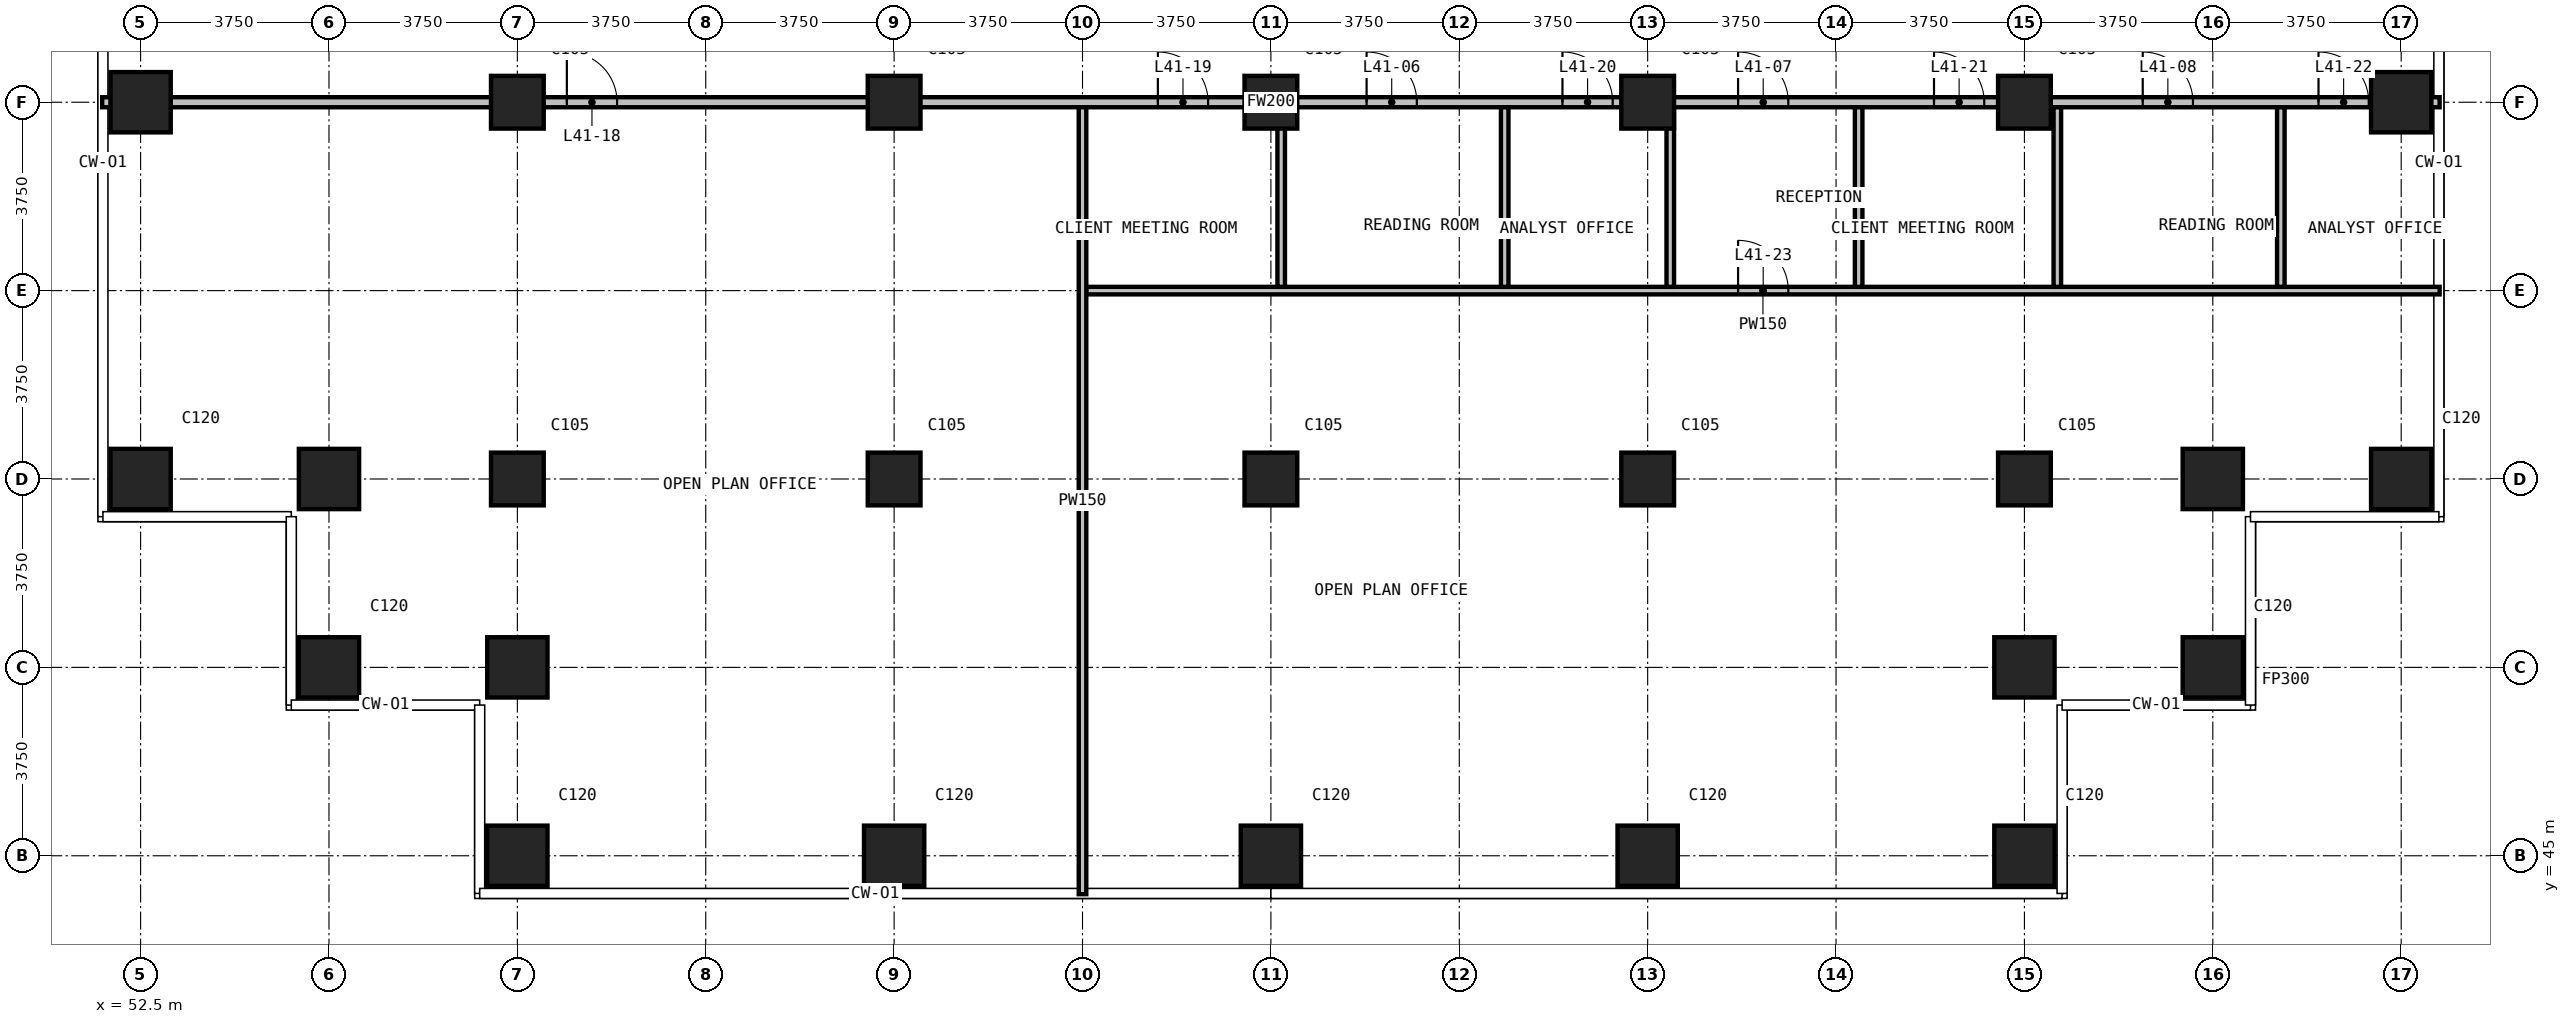
"""IFC4 building model, lengths in metres.
Left out: names, types, materials, properties, quantities, classifications, styles, units other than length and angle.
Written with IfcOpenShell. Run it as: python <this file> out.ifc"""

import sys

from ifc_helpers import new_model, si_unit, direction, frame, frame_2d, origin, origin_2d, place, context, subcontext, project, spatial, rectangle, extrude, element, fill, save


model = new_model("IFC4")
c1 = context("Model", 3, precision=1e-05, world=origin(), true_north=direction((0.0, 1.0)))
c2 = subcontext(c1, "Body", "Model", "MODEL_VIEW")
j1 = project(units=[si_unit("LENGTHUNIT", "METRE"), si_unit("PLANEANGLEUNIT", "RADIAN")], contexts=[c1])
p1 = place(None, origin())
s1 = spatial("IfcSite", under=j1, at=p1, CompositionType="ELEMENT")
p2 = place(p1, origin())
s2 = spatial("IfcBuilding", under=s1, at=p2, CompositionType="ELEMENT")
p3 = place(p2, frame((0.0, 0.0, 162.1)))
s3 = spatial("IfcBuildingStorey", under=s2, at=p3, CompositionType="ELEMENT", Elevation=162.1)
for number, where, z_axis, x_axis in (
    (1, (52.5, 52.5, 0.0), (0.0, 0.0, 1.0), (1.0, 0.0, 0.0)),
    (2, (52.5, 60.0, 0.0), (0.0, 0.0, 1.0), (1.0, 0.0, 0.0)),
    (3, (56.25, 48.75, 0.0), (0.0, 0.0, 1.0), (1.0, 0.0, 0.0)),
    (4, (56.25, 52.5, 0.0), (0.0, 0.0, 1.0), (1.0, 0.0, 0.0)),
    (5, (60.0, 45.0, 0.0), (0.0, 0.0, 1.0), (1.0, 0.0, 0.0)),
    (6, (60.0, 48.75, 0.0), (0.0, 0.0, 1.0), (1.0, 0.0, 0.0)),
):
    element("IfcColumn", number, at=place(p3, frame(where, z_axis=z_axis, x_axis=x_axis)), inside=s3, PredefinedType="COLUMN", context=c2, shape_type="SweptSolid", body=[
        extrude(rectangle(XDim=1.2, YDim=1.2, at=origin_2d()), origin(), (0.0, 0.0, 1.0), 3.6),
    ])
for number, where, z_axis, x_axis in (
    (7, (60.0, 52.5, 0.0), (0.0, 0.0, 1.0), (1.0, 0.0, 0.0)),
    (8, (60.0, 60.0, 0.0), (0.0, 0.0, 1.0), (1.0, 0.0, 0.0)),
):
    element("IfcColumn", number, at=place(p3, frame(where, z_axis=z_axis, x_axis=x_axis)), inside=s3, PredefinedType="COLUMN", context=c2, shape_type="SweptSolid", body=[
        extrude(rectangle(XDim=1.05, YDim=1.05, at=origin_2d()), origin(), (0.0, 0.0, 1.0), 3.6),
    ])
p4 = place(p3, frame((67.5, 45.0, 0.0), z_axis=(0.0, 0.0, 1.0), x_axis=(1.0, 0.0, 0.0)))
e9 = element("IfcColumn", 9, at=p4, inside=s3, PredefinedType="COLUMN", context=c2, shape_type="SweptSolid", body=[
    extrude(rectangle(XDim=1.2, YDim=1.2, at=origin_2d()), origin(), (0.0, 0.0, 1.0), 3.6),
])
for number, where, z_axis, x_axis in (
    (10, (67.5, 52.5, 0.0), (0.0, 0.0, 1.0), (1.0, 0.0, 0.0)),
    (11, (67.5, 60.0, 0.0), (0.0, 0.0, 1.0), (1.0, 0.0, 0.0)),
):
    element("IfcColumn", number, at=place(p3, frame(where, z_axis=z_axis, x_axis=x_axis)), inside=s3, PredefinedType="COLUMN", context=c2, shape_type="SweptSolid", body=[
        extrude(rectangle(XDim=1.05, YDim=1.05, at=origin_2d()), origin(), (0.0, 0.0, 1.0), 3.6),
    ])
p5 = place(p3, frame((75.0, 45.0, 0.0), z_axis=(0.0, 0.0, 1.0), x_axis=(1.0, 0.0, 0.0)))
e12 = element("IfcColumn", 12, at=p5, inside=s3, PredefinedType="COLUMN", context=c2, shape_type="SweptSolid", body=[
    extrude(rectangle(XDim=1.2, YDim=1.2, at=origin_2d()), origin(), (0.0, 0.0, 1.0), 3.6),
])
for number, where, z_axis, x_axis in (
    (13, (75.0, 52.5, 0.0), (0.0, 0.0, 1.0), (1.0, 0.0, 0.0)),
    (14, (75.0, 60.0, 0.0), (0.0, 0.0, 1.0), (1.0, 0.0, 0.0)),
):
    element("IfcColumn", number, at=place(p3, frame(where, z_axis=z_axis, x_axis=x_axis)), inside=s3, PredefinedType="COLUMN", context=c2, shape_type="SweptSolid", body=[
        extrude(rectangle(XDim=1.05, YDim=1.05, at=origin_2d()), origin(), (0.0, 0.0, 1.0), 3.6),
    ])
p6 = place(p3, frame((82.5, 45.0, 0.0), z_axis=(0.0, 0.0, 1.0), x_axis=(1.0, 0.0, 0.0)))
e15 = element("IfcColumn", 15, at=p6, inside=s3, PredefinedType="COLUMN", context=c2, shape_type="SweptSolid", body=[
    extrude(rectangle(XDim=1.2, YDim=1.2, at=origin_2d()), origin(), (0.0, 0.0, 1.0), 3.6),
])
for number, where, z_axis, x_axis in (
    (16, (82.5, 52.5, 0.0), (0.0, 0.0, 1.0), (1.0, 0.0, 0.0)),
    (17, (82.5, 60.0, 0.0), (0.0, 0.0, 1.0), (1.0, 0.0, 0.0)),
):
    element("IfcColumn", number, at=place(p3, frame(where, z_axis=z_axis, x_axis=x_axis)), inside=s3, PredefinedType="COLUMN", context=c2, shape_type="SweptSolid", body=[
        extrude(rectangle(XDim=1.05, YDim=1.05, at=origin_2d()), origin(), (0.0, 0.0, 1.0), 3.6),
    ])
for number, where, z_axis, x_axis in (
    (18, (90.0, 45.0, 0.0), (0.0, 0.0, 1.0), (1.0, 0.0, 0.0)),
    (19, (90.0, 48.75, 0.0), (0.0, 0.0, 1.0), (1.0, 0.0, 0.0)),
):
    element("IfcColumn", number, at=place(p3, frame(where, z_axis=z_axis, x_axis=x_axis)), inside=s3, PredefinedType="COLUMN", context=c2, shape_type="SweptSolid", body=[
        extrude(rectangle(XDim=1.2, YDim=1.2, at=origin_2d()), origin(), (0.0, 0.0, 1.0), 3.6),
    ])
for number, where, z_axis, x_axis in (
    (20, (90.0, 52.5, 0.0), (0.0, 0.0, 1.0), (1.0, 0.0, 0.0)),
    (21, (90.0, 60.0, 0.0), (0.0, 0.0, 1.0), (1.0, 0.0, 0.0)),
):
    element("IfcColumn", number, at=place(p3, frame(where, z_axis=z_axis, x_axis=x_axis)), inside=s3, PredefinedType="COLUMN", context=c2, shape_type="SweptSolid", body=[
        extrude(rectangle(XDim=1.05, YDim=1.05, at=origin_2d()), origin(), (0.0, 0.0, 1.0), 3.6),
    ])
for number, where, z_axis, x_axis in (
    (22, (93.75, 48.75, 0.0), (0.0, 0.0, 1.0), (1.0, 0.0, 0.0)),
    (23, (93.75, 52.5, 0.0), (0.0, 0.0, 1.0), (1.0, 0.0, 0.0)),
    (24, (97.5, 52.5, 0.0), (0.0, 0.0, 1.0), (1.0, 0.0, 0.0)),
    (25, (97.5, 60.0, 0.0), (0.0, 0.0, 1.0), (1.0, 0.0, 0.0)),
):
    element("IfcColumn", number, at=place(p3, frame(where, z_axis=z_axis, x_axis=x_axis)), inside=s3, PredefinedType="COLUMN", context=c2, shape_type="SweptSolid", body=[
        extrude(rectangle(XDim=1.2, YDim=1.2, at=origin_2d()), origin(), (0.0, 0.0, 1.0), 3.6),
    ])
p7 = place(p3, frame((51.735, 60.0, 0.0), z_axis=(0.0, 0.0, 1.0), x_axis=(1.0, 0.0, 0.0)))
e26 = element("IfcWall", 26, at=p7, inside=s3, PredefinedType="PARTITIONING", context=c2, shape_type="SweptSolid", body=[
    extrude(rectangle(XDim=46.53, YDim=0.2, at=frame_2d((23.265, 0.0))), origin(), (0.0, 0.0, 1.0), 3.3),
])
p8 = place(p7, frame((25.17, 0.0, 0.0)))
e27 = element("IfcOpeningElement", 27, at=p8, cuts=e26, PredefinedType="OPENING", context=c2, shape_type="SweptSolid", body=[
    extrude(rectangle(XDim=1.0, YDim=2.2, at=frame_2d((0.5, 1.1))), frame((0.0, 0.11, 0.0), z_axis=(0.0, -1.0, 0.0), x_axis=(1.0, 0.0, 0.0)), (0.0, 0.0, 1.0), 0.22),
])
p9 = place(p7, frame((32.565, 0.0, 0.0)))
e28 = element("IfcOpeningElement", 28, at=p9, cuts=e26, PredefinedType="OPENING", context=c2, shape_type="SweptSolid", body=[
    extrude(rectangle(XDim=1.0, YDim=2.2, at=frame_2d((0.5, 1.1))), frame((0.0, 0.11, 0.0), z_axis=(0.0, -1.0, 0.0), x_axis=(1.0, 0.0, 0.0)), (0.0, 0.0, 1.0), 0.22),
])
p10 = place(p7, frame((40.62, 0.0, 0.0)))
e29 = element("IfcOpeningElement", 29, at=p10, cuts=e26, PredefinedType="OPENING", context=c2, shape_type="SweptSolid", body=[
    extrude(rectangle(XDim=1.0, YDim=2.2, at=frame_2d((0.5, 1.1))), frame((0.0, 0.11, 0.0), z_axis=(0.0, -1.0, 0.0), x_axis=(1.0, 0.0, 0.0)), (0.0, 0.0, 1.0), 0.22),
])
p11 = place(p7, frame((9.25, 0.0, 0.0)))
e30 = element("IfcOpeningElement", 30, at=p11, cuts=e26, PredefinedType="OPENING", context=c2, shape_type="SweptSolid", body=[
    extrude(rectangle(XDim=1.0, YDim=2.2, at=frame_2d((0.5, 1.1))), frame((0.0, 0.11, 0.0), z_axis=(0.0, -1.0, 0.0), x_axis=(1.0, 0.0, 0.0)), (0.0, 0.0, 1.0), 0.22),
])
p12 = place(p7, frame((21.015, 0.0, 0.0)))
e31 = element("IfcOpeningElement", 31, at=p12, cuts=e26, PredefinedType="OPENING", context=c2, shape_type="SweptSolid", body=[
    extrude(rectangle(XDim=1.0, YDim=2.2, at=frame_2d((0.5, 1.1))), frame((0.0, 0.11, 0.0), z_axis=(0.0, -1.0, 0.0), x_axis=(1.0, 0.0, 0.0)), (0.0, 0.0, 1.0), 0.22),
])
p13 = place(p7, frame((29.069, 0.0, 0.0)))
e32 = element("IfcOpeningElement", 32, at=p13, cuts=e26, PredefinedType="OPENING", context=c2, shape_type="SweptSolid", body=[
    extrude(rectangle(XDim=1.0, YDim=2.2, at=frame_2d((0.5, 1.1))), frame((0.0, 0.11, 0.0), z_axis=(0.0, -1.0, 0.0), x_axis=(1.0, 0.0, 0.0)), (0.0, 0.0, 1.0), 0.22),
])
p14 = place(p7, frame((36.465, 0.0, 0.0)))
e33 = element("IfcOpeningElement", 33, at=p14, cuts=e26, PredefinedType="OPENING", context=c2, shape_type="SweptSolid", body=[
    extrude(rectangle(XDim=1.0, YDim=2.2, at=frame_2d((0.5, 1.1))), frame((0.0, 0.11, 0.0), z_axis=(0.0, -1.0, 0.0), x_axis=(1.0, 0.0, 0.0)), (0.0, 0.0, 1.0), 0.22),
])
p15 = place(p7, frame((44.119, 0.0, 0.0)))
e34 = element("IfcOpeningElement", 34, at=p15, cuts=e26, PredefinedType="OPENING", context=c2, shape_type="SweptSolid", body=[
    extrude(rectangle(XDim=1.0, YDim=2.2, at=frame_2d((0.5, 1.1))), frame((0.0, 0.11, 0.0), z_axis=(0.0, -1.0, 0.0), x_axis=(1.0, 0.0, 0.0)), (0.0, 0.0, 1.0), 0.22),
])
p16 = place(p3, frame((71.325, 56.25, 0.0), z_axis=(0.0, 0.0, 1.0), x_axis=(1.0, 0.0, 0.0)))
e35 = element("IfcWall", 35, at=p16, inside=s3, PredefinedType="PARTITIONING", context=c2, shape_type="SweptSolid", body=[
    extrude(rectangle(XDim=26.94, YDim=0.15, at=frame_2d((13.47, 0.0))), origin(), (0.0, 0.0, 1.0), 3.3),
])
p17 = place(p16, frame((12.975, 0.0, 0.0)))
e36 = element("IfcOpeningElement", 36, at=p17, cuts=e35, PredefinedType="OPENING", context=c2, shape_type="SweptSolid", body=[
    extrude(rectangle(XDim=1.0, YDim=2.2, at=frame_2d((0.5, 1.1))), frame((0.0, 0.085, 0.0), z_axis=(0.0, -1.0, 0.0), x_axis=(1.0, 0.0, 0.0)), (0.0, 0.0, 1.0), 0.17),
])
p18 = place(p3, frame((71.25, 44.235, 0.0), z_axis=(0.0, 0.0, 1.0), x_axis=(0.0, 1.0, 0.0)))
e37 = element("IfcWall", 37, at=p18, inside=s3, PredefinedType="PARTITIONING", context=c2, shape_type="SweptSolid", body=[
    extrude(rectangle(XDim=15.665, YDim=0.15, at=frame_2d((7.833, 0.0))), origin(), (0.0, 0.0, 1.0), 3.3),
])
for number, where, z_axis, x_axis in (
    (38, (75.205, 56.325, 0.0), (0.0, 0.0, 1.0), (0.0, 1.0, 0.0)),
    (39, (79.654, 56.325, 0.0), (0.0, 0.0, 1.0), (0.0, 1.0, 0.0)),
    (40, (82.95, 56.325, 0.0), (0.0, 0.0, 1.0), (0.0, 1.0, 0.0)),
    (41, (86.7, 56.325, 0.0), (0.0, 0.0, 1.0), (0.0, 1.0, 0.0)),
    (42, (90.655, 56.325, 0.0), (0.0, 0.0, 1.0), (0.0, 1.0, 0.0)),
    (43, (95.104, 56.325, 0.0), (0.0, 0.0, 1.0), (0.0, 1.0, 0.0)),
):
    element("IfcWall", number, at=place(p3, frame(where, z_axis=z_axis, x_axis=x_axis)), inside=s3, PredefinedType="PARTITIONING", context=c2, shape_type="SweptSolid", body=[
        extrude(rectangle(XDim=3.575, YDim=0.15, at=frame_2d((1.788, 0.0))), origin(), (0.0, 0.0, 1.0), 3.3),
    ])
p19 = place(p8, origin())
e44 = element("IfcDoor", 44, at=p19, inside=s3, OperationType="SINGLE_SWING_LEFT", PredefinedType="DOOR", context=c2, shape_type="SweptSolid", body=[
    extrude(rectangle(XDim=1.0, YDim=2.2, at=frame_2d((0.5, 1.1))), frame((0.0, 0.025, 0.0), z_axis=(0.0, -1.0, 0.0), x_axis=(1.0, 0.0, 0.0)), (0.0, 0.0, 1.0), 0.05),
])
fill(e27, e44)
p20 = place(p9, origin())
e45 = element("IfcDoor", 45, at=p20, inside=s3, OperationType="SINGLE_SWING_LEFT", PredefinedType="DOOR", context=c2, shape_type="SweptSolid", body=[
    extrude(rectangle(XDim=1.0, YDim=2.2, at=frame_2d((0.5, 1.1))), frame((0.0, 0.025, 0.0), z_axis=(0.0, -1.0, 0.0), x_axis=(1.0, 0.0, 0.0)), (0.0, 0.0, 1.0), 0.05),
])
fill(e28, e45)
p21 = place(p10, origin())
e46 = element("IfcDoor", 46, at=p21, inside=s3, OperationType="SINGLE_SWING_RIGHT", PredefinedType="DOOR", context=c2, shape_type="SweptSolid", body=[
    extrude(rectangle(XDim=1.0, YDim=2.2, at=frame_2d((0.5, 1.1))), frame((0.0, 0.025, 0.0), z_axis=(0.0, -1.0, 0.0), x_axis=(1.0, 0.0, 0.0)), (0.0, 0.0, 1.0), 0.05),
])
fill(e29, e46)
p22 = place(p11, origin())
e47 = element("IfcDoor", 47, at=p22, inside=s3, OperationType="SINGLE_SWING_LEFT", PredefinedType="DOOR", context=c2, shape_type="SweptSolid", body=[
    extrude(rectangle(XDim=1.0, YDim=2.2, at=frame_2d((0.5, 1.1))), frame((0.0, 0.025, 0.0), z_axis=(0.0, -1.0, 0.0), x_axis=(1.0, 0.0, 0.0)), (0.0, 0.0, 1.0), 0.05),
])
fill(e30, e47)
p23 = place(p12, origin())
e48 = element("IfcDoor", 48, at=p23, inside=s3, OperationType="SINGLE_SWING_LEFT", PredefinedType="DOOR", context=c2, shape_type="SweptSolid", body=[
    extrude(rectangle(XDim=1.0, YDim=2.2, at=frame_2d((0.5, 1.1))), frame((0.0, 0.025, 0.0), z_axis=(0.0, -1.0, 0.0), x_axis=(1.0, 0.0, 0.0)), (0.0, 0.0, 1.0), 0.05),
])
fill(e31, e48)
p24 = place(p13, origin())
e49 = element("IfcDoor", 49, at=p24, inside=s3, OperationType="SINGLE_SWING_LEFT", PredefinedType="DOOR", context=c2, shape_type="SweptSolid", body=[
    extrude(rectangle(XDim=1.0, YDim=2.2, at=frame_2d((0.5, 1.1))), frame((0.0, 0.025, 0.0), z_axis=(0.0, -1.0, 0.0), x_axis=(1.0, 0.0, 0.0)), (0.0, 0.0, 1.0), 0.05),
])
fill(e32, e49)
p25 = place(p14, origin())
e50 = element("IfcDoor", 50, at=p25, inside=s3, OperationType="SINGLE_SWING_LEFT", PredefinedType="DOOR", context=c2, shape_type="SweptSolid", body=[
    extrude(rectangle(XDim=1.0, YDim=2.2, at=frame_2d((0.5, 1.1))), frame((0.0, 0.025, 0.0), z_axis=(0.0, -1.0, 0.0), x_axis=(1.0, 0.0, 0.0)), (0.0, 0.0, 1.0), 0.05),
])
fill(e33, e50)
p26 = place(p15, origin())
e51 = element("IfcDoor", 51, at=p26, inside=s3, OperationType="SINGLE_SWING_LEFT", PredefinedType="DOOR", context=c2, shape_type="SweptSolid", body=[
    extrude(rectangle(XDim=1.0, YDim=2.2, at=frame_2d((0.5, 1.1))), frame((0.0, 0.025, 0.0), z_axis=(0.0, -1.0, 0.0), x_axis=(1.0, 0.0, 0.0)), (0.0, 0.0, 1.0), 0.05),
])
fill(e34, e51)
p27 = place(p17, origin())
e52 = element("IfcDoor", 52, at=p27, inside=s3, OperationType="SINGLE_SWING_LEFT", PredefinedType="DOOR", context=c2, shape_type="SweptSolid", body=[
    extrude(rectangle(XDim=1.0, YDim=2.2, at=frame_2d((0.5, 1.1))), frame((0.0, 0.025, 0.0), z_axis=(0.0, -1.0, 0.0), x_axis=(1.0, 0.0, 0.0)), (0.0, 0.0, 1.0), 0.05),
])
fill(e36, e52)
save(model, sys.argv[1])
